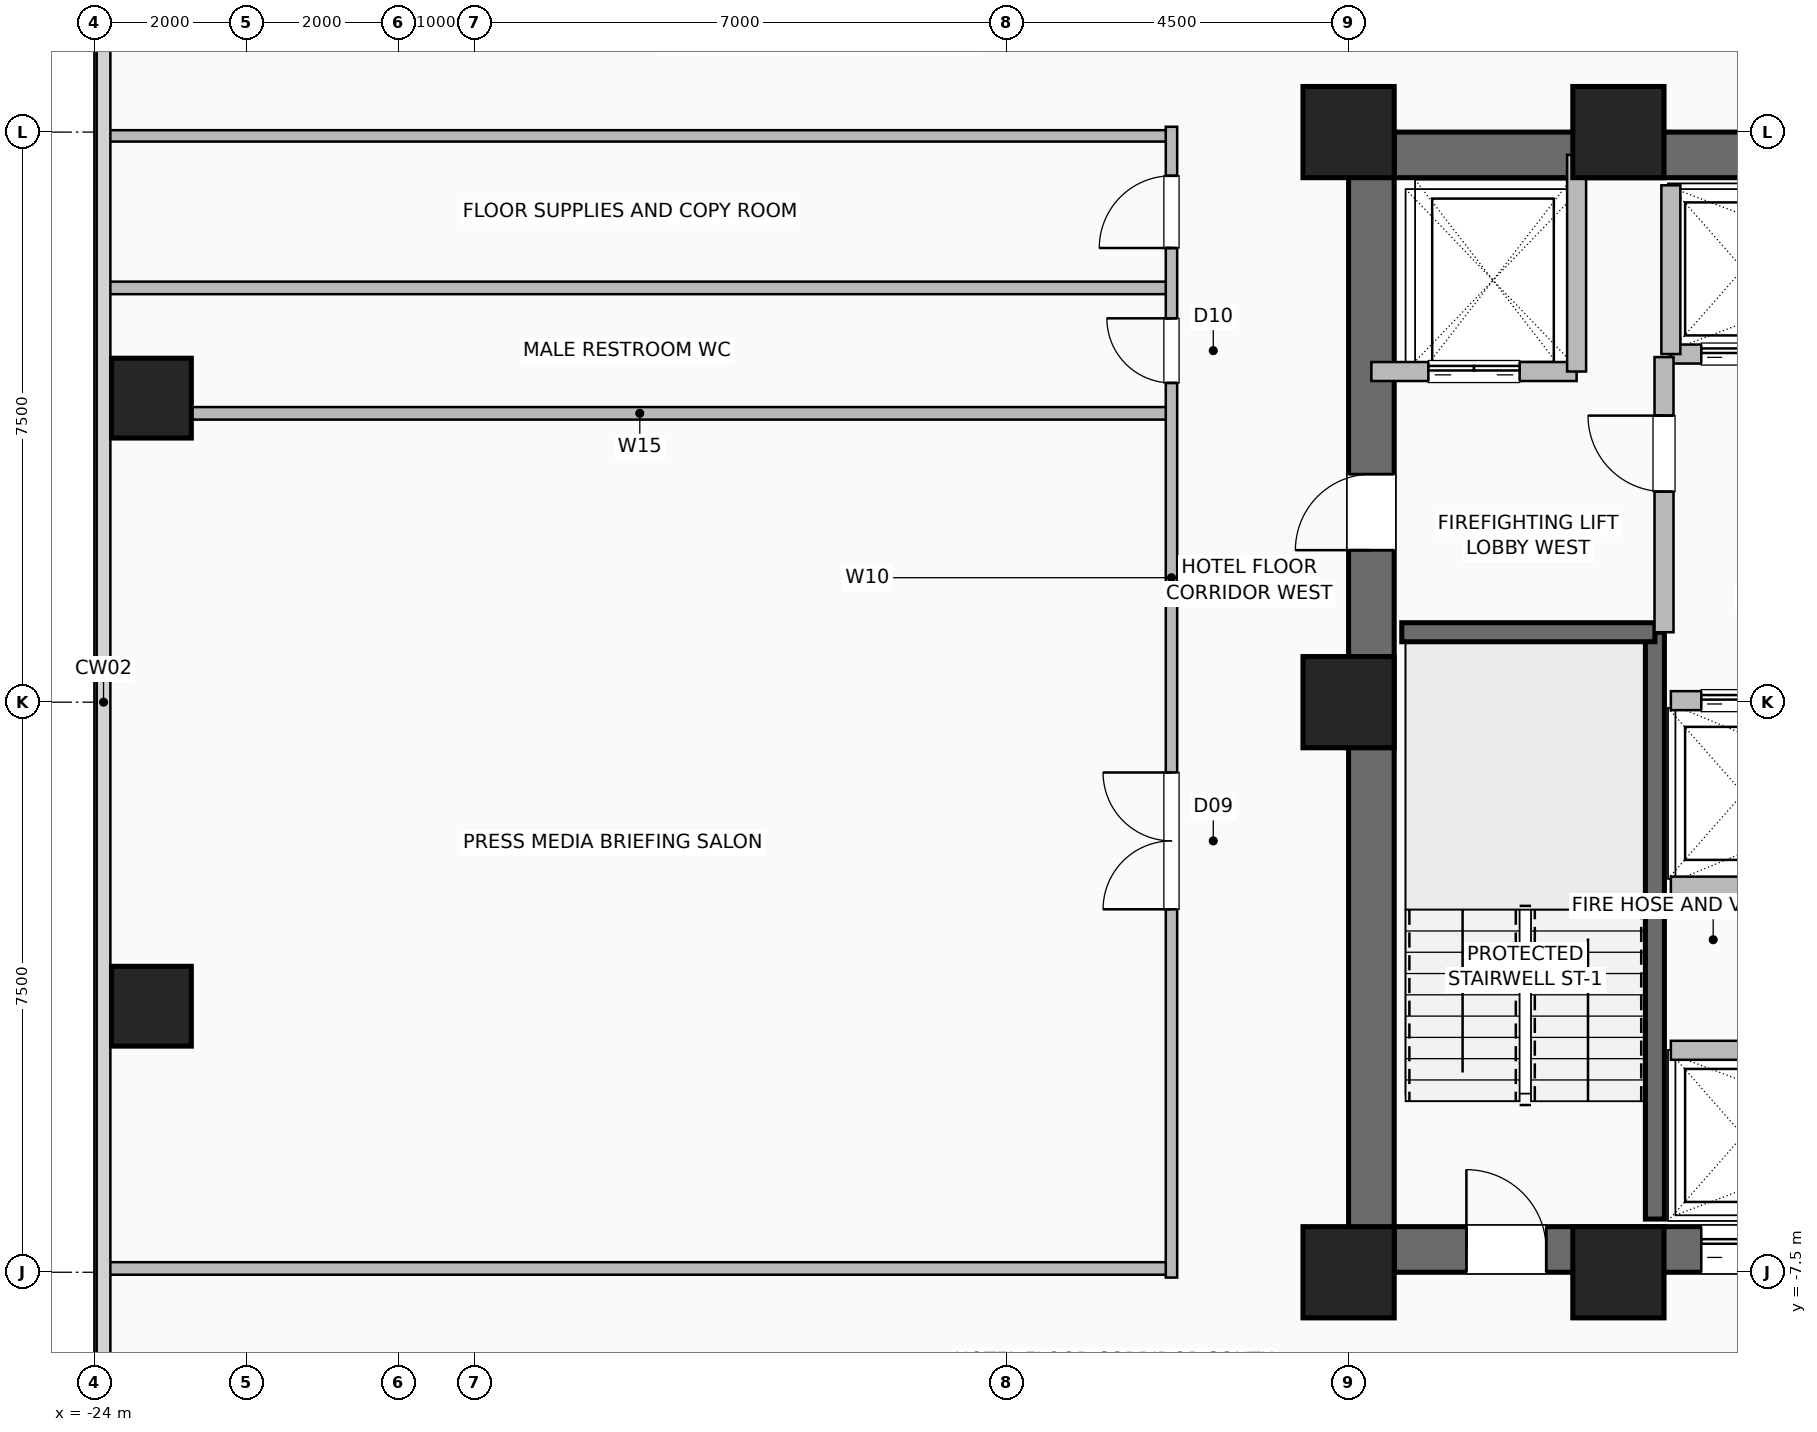
"""IFC4 building model, lengths in metres.
Left out: names, types, materials, properties, quantities, classifications, styles, units other than length and angle.
Written with IfcOpenShell. Run it as: python <this file> out.ifc"""

import sys

from ifc_helpers import new_model, si_unit, direction, frame, frame_2d, origin, origin_2d, place, context, subcontext, project, spatial, rectangle, hollow_rectangle, extrude, element, fill, save


model = new_model("IFC4")
c1 = context("Model", 3, precision=1e-05, world=origin(), true_north=direction((0.0, 1.0)))
c2 = subcontext(c1, "Body", "Model", "MODEL_VIEW")
j1 = project(units=[si_unit("LENGTHUNIT", "METRE"), si_unit("PLANEANGLEUNIT", "RADIAN")], contexts=[c1])
p1 = place(None, origin())
s1 = spatial("IfcSite", under=j1, at=p1, CompositionType="ELEMENT")
p2 = place(p1, origin())
s2 = spatial("IfcBuilding", under=s1, at=p2, CompositionType="ELEMENT")
p3 = place(p2, frame((0.0, 0.0, 41.0)))
s3 = spatial("IfcBuildingStorey", under=s2, at=p3, CompositionType="ELEMENT", Elevation=41.0)
for number, where, z_axis, x_axis in (
    (1, (-7.5, -7.5, 0.0), (0.0, 0.0, 1.0), (1.0, 0.0, 0.0)),
    (2, (-3.95, -7.5, 0.0), (0.0, 0.0, 1.0), (1.0, 0.0, 0.0)),
    (3, (-3.95, 7.5, 0.0), (0.0, 0.0, 1.0), (1.0, 0.0, 0.0)),
    (4, (-7.5, 7.5, 0.0), (0.0, 0.0, 1.0), (1.0, 0.0, 0.0)),
    (5, (-7.5, 0.0, 0.0), (0.0, 0.0, 1.0), (1.0, 0.0, 0.0)),
):
    element("IfcColumn", number, at=place(p3, frame(where, z_axis=z_axis, x_axis=x_axis)), inside=s3, PredefinedType="COLUMN", context=c2, shape_type="SweptSolid", body=[
        extrude(hollow_rectangle(XDim=1.2, YDim=1.2, WallThickness=0.055, at=origin_2d()), origin(), (0.0, 0.0, 1.0), 3.5),
    ])
for number, where, z_axis, x_axis in (
    (6, (-23.25, -4.0, 0.0), (0.0, 0.0, 1.0), (1.0, 0.0, 0.0)),
    (7, (-23.25, 4.0, 0.0), (0.0, 0.0, 1.0), (1.0, 0.0, 0.0)),
):
    element("IfcColumn", number, at=place(p3, frame(where, z_axis=z_axis, x_axis=x_axis)), inside=s3, PredefinedType="COLUMN", context=c2, shape_type="SweptSolid", body=[
        extrude(hollow_rectangle(XDim=1.05, YDim=1.05, WallThickness=0.05, at=origin_2d()), origin(), (0.0, 0.0, 1.0), 3.5),
    ])
p4 = place(p3, frame((-7.5, -7.2, 0.0), z_axis=(0.0, 0.0, 1.0), x_axis=(1.0, 0.0, 0.0)))
e8 = element("IfcWall", 8, at=p4, inside=s3, PredefinedType="SHEAR", context=c2, shape_type="SweptSolid", body=[
    extrude(rectangle(XDim=15.0, YDim=0.6, at=frame_2d((7.5, 0.0))), origin(), (0.0, 0.0, 1.0), 3.25),
])
p5 = place(p4, frame((1.55, 0.0, 0.0)))
e9 = element("IfcOpeningElement", 9, at=p5, cuts=e8, PredefinedType="OPENING", context=c2, shape_type="SweptSolid", body=[
    extrude(rectangle(XDim=1.05, YDim=2.08, at=frame_2d((0.525, 1.04))), frame((0.0, 0.31, 0.0), z_axis=(0.0, -1.0, 0.0), x_axis=(1.0, 0.0, 0.0)), (0.0, 0.0, 1.0), 0.62),
])
p6 = place(p4, frame((12.4, 0.0, 0.0)))
e10 = element("IfcOpeningElement", 10, at=p6, cuts=e8, PredefinedType="OPENING", context=c2, shape_type="SweptSolid", body=[
    extrude(rectangle(XDim=1.05, YDim=2.08, at=frame_2d((0.525, 1.04))), frame((0.0, 0.31, 0.0), z_axis=(0.0, -1.0, 0.0), x_axis=(1.0, 0.0, 0.0)), (0.0, 0.0, 1.0), 0.62),
])
p7 = place(p4, frame((4.64, 0.0, 0.0)))
e11 = element("IfcOpeningElement", 11, at=p7, cuts=e8, PredefinedType="OPENING", context=c2, shape_type="SweptSolid", body=[
    extrude(rectangle(XDim=1.1, YDim=2.2, at=frame_2d((0.55, 1.1))), frame((0.0, 0.31, 0.0), z_axis=(0.0, -1.0, 0.0), x_axis=(1.0, 0.0, 0.0)), (0.0, 0.0, 1.0), 0.62),
])
p8 = place(p4, frame((6.52, 0.0, 0.0)))
e12 = element("IfcOpeningElement", 12, at=p8, cuts=e8, PredefinedType="OPENING", context=c2, shape_type="SweptSolid", body=[
    extrude(rectangle(XDim=1.1, YDim=2.2, at=frame_2d((0.55, 1.1))), frame((0.0, 0.31, 0.0), z_axis=(0.0, -1.0, 0.0), x_axis=(1.0, 0.0, 0.0)), (0.0, 0.0, 1.0), 0.62),
])
p9 = place(p4, frame((8.4, 0.0, 0.0)))
e13 = element("IfcOpeningElement", 13, at=p9, cuts=e8, PredefinedType="OPENING", context=c2, shape_type="SweptSolid", body=[
    extrude(rectangle(XDim=1.1, YDim=2.2, at=frame_2d((0.55, 1.1))), frame((0.0, 0.31, 0.0), z_axis=(0.0, -1.0, 0.0), x_axis=(1.0, 0.0, 0.0)), (0.0, 0.0, 1.0), 0.62),
])
p10 = place(p3, frame((-7.5, 7.2, 0.0), z_axis=(0.0, 0.0, 1.0), x_axis=(1.0, 0.0, 0.0)))
e14 = element("IfcWall", 14, at=p10, inside=s3, PredefinedType="SHEAR", context=c2, shape_type="SweptSolid", body=[
    extrude(rectangle(XDim=15.0, YDim=0.6, at=frame_2d((7.5, 0.0))), origin(), (0.0, 0.0, 1.0), 3.25),
])
p11 = place(p3, frame((-7.2, -7.5, 0.0), z_axis=(0.0, 0.0, 1.0), x_axis=(0.0, 1.0, 0.0)))
e15 = element("IfcWall", 15, at=p11, inside=s3, PredefinedType="SHEAR", context=c2, shape_type="SweptSolid", body=[
    extrude(rectangle(XDim=15.0, YDim=0.6, at=frame_2d((7.5, 0.0))), origin(), (0.0, 0.0, 1.0), 3.25),
])
p12 = place(p11, frame((9.5, 0.0, 0.0)))
e16 = element("IfcOpeningElement", 16, at=p12, cuts=e15, PredefinedType="OPENING", context=c2, shape_type="SweptSolid", body=[
    extrude(rectangle(XDim=1.0, YDim=2.08, at=frame_2d((0.5, 1.04))), frame((0.0, 0.31, 0.0), z_axis=(0.0, -1.0, 0.0), x_axis=(1.0, 0.0, 0.0)), (0.0, 0.0, 1.0), 0.62),
])
p13 = place(p3, frame((-3.47, -6.8, 0.0), z_axis=(0.0, 0.0, 1.0), x_axis=(0.0, 1.0, 0.0)))
e17 = element("IfcWall", 17, at=p13, inside=s3, PredefinedType="SHEAR", context=c2, shape_type="SweptSolid", body=[
    extrude(rectangle(XDim=7.72, YDim=0.25, at=frame_2d((3.86, 0.0))), origin(), (0.0, 0.0, 1.0), 3.25),
])
p14 = place(p3, frame((-6.8, 0.92, 0.0), z_axis=(0.0, 0.0, 1.0), x_axis=(1.0, 0.0, 0.0)))
e18 = element("IfcWall", 18, at=p14, inside=s3, PredefinedType="SHEAR", context=c2, shape_type="SweptSolid", body=[
    extrude(rectangle(XDim=3.33, YDim=0.25, at=frame_2d((1.665, 0.0))), origin(), (0.0, 0.0, 1.0), 3.25),
])
p15 = place(p3, frame((-3.26, -4.58, 0.0), z_axis=(0.0, 0.0, 1.0), x_axis=(1.0, 0.0, 0.0)))
e19 = element("IfcWall", 19, at=p15, inside=s3, PredefinedType="SHEAR", context=c2, shape_type="SweptSolid", body=[
    extrude(rectangle(XDim=5.64, YDim=0.25, at=frame_2d((2.82, 0.0))), origin(), (0.0, 0.0, 1.0), 3.25),
])
p16 = place(p3, frame((-3.26, 0.02, 0.0), z_axis=(0.0, 0.0, 1.0), x_axis=(1.0, 0.0, 0.0)))
e20 = element("IfcWall", 20, at=p16, inside=s3, PredefinedType="SHEAR", context=c2, shape_type="SweptSolid", body=[
    extrude(rectangle(XDim=5.64, YDim=0.25, at=frame_2d((2.82, 0.0))), origin(), (0.0, 0.0, 1.0), 3.25),
])
p17 = place(p16, frame((0.4, 0.0, 0.0)))
e21 = element("IfcOpeningElement", 21, at=p17, cuts=e20, PredefinedType="OPENING", context=c2, shape_type="SweptSolid", body=[
    extrude(rectangle(XDim=1.1, YDim=2.2, at=frame_2d((0.55, 1.1))), frame((0.0, 0.135, 0.0), z_axis=(0.0, -1.0, 0.0), x_axis=(1.0, 0.0, 0.0)), (0.0, 0.0, 1.0), 0.27),
])
p18 = place(p16, frame((2.28, 0.0, 0.0)))
e22 = element("IfcOpeningElement", 22, at=p18, cuts=e20, PredefinedType="OPENING", context=c2, shape_type="SweptSolid", body=[
    extrude(rectangle(XDim=1.1, YDim=2.2, at=frame_2d((0.55, 1.1))), frame((0.0, 0.135, 0.0), z_axis=(0.0, -1.0, 0.0), x_axis=(1.0, 0.0, 0.0)), (0.0, 0.0, 1.0), 0.27),
])
p19 = place(p16, frame((4.16, 0.0, 0.0)))
e23 = element("IfcOpeningElement", 23, at=p19, cuts=e20, PredefinedType="OPENING", context=c2, shape_type="SweptSolid", body=[
    extrude(rectangle(XDim=1.1, YDim=2.2, at=frame_2d((0.55, 1.1))), frame((0.0, 0.135, 0.0), z_axis=(0.0, -1.0, 0.0), x_axis=(1.0, 0.0, 0.0)), (0.0, 0.0, 1.0), 0.27),
])
p20 = place(p3, frame((-3.26, -2.42, 0.0), z_axis=(0.0, 0.0, 1.0), x_axis=(1.0, 0.0, 0.0)))
e24 = element("IfcWall", 24, at=p20, inside=s3, PredefinedType="SHEAR", context=c2, shape_type="SweptSolid", body=[
    extrude(rectangle(XDim=5.64, YDim=0.25, at=frame_2d((2.82, 0.0))), origin(), (0.0, 0.0, 1.0), 3.25),
])
p21 = place(p3, frame((-3.26, 4.58, 0.0), z_axis=(0.0, 0.0, 1.0), x_axis=(1.0, 0.0, 0.0)))
e25 = element("IfcWall", 25, at=p21, inside=s3, PredefinedType="SHEAR", context=c2, shape_type="SweptSolid", body=[
    extrude(rectangle(XDim=5.64, YDim=0.25, at=frame_2d((2.82, 0.0))), origin(), (0.0, 0.0, 1.0), 3.25),
])
p22 = place(p21, frame((0.4, 0.0, 0.0)))
e26 = element("IfcOpeningElement", 26, at=p22, cuts=e25, PredefinedType="OPENING", context=c2, shape_type="SweptSolid", body=[
    extrude(rectangle(XDim=1.1, YDim=2.2, at=frame_2d((0.55, 1.1))), frame((0.0, 0.135, 0.0), z_axis=(0.0, -1.0, 0.0), x_axis=(1.0, 0.0, 0.0)), (0.0, 0.0, 1.0), 0.27),
])
p23 = place(p21, frame((2.28, 0.0, 0.0)))
e27 = element("IfcOpeningElement", 27, at=p23, cuts=e25, PredefinedType="OPENING", context=c2, shape_type="SweptSolid", body=[
    extrude(rectangle(XDim=1.1, YDim=2.2, at=frame_2d((0.55, 1.1))), frame((0.0, 0.135, 0.0), z_axis=(0.0, -1.0, 0.0), x_axis=(1.0, 0.0, 0.0)), (0.0, 0.0, 1.0), 0.27),
])
p24 = place(p21, frame((4.16, 0.0, 0.0)))
e28 = element("IfcOpeningElement", 28, at=p24, cuts=e25, PredefinedType="OPENING", context=c2, shape_type="SweptSolid", body=[
    extrude(rectangle(XDim=1.1, YDim=2.2, at=frame_2d((0.55, 1.1))), frame((0.0, 0.135, 0.0), z_axis=(0.0, -1.0, 0.0), x_axis=(1.0, 0.0, 0.0)), (0.0, 0.0, 1.0), 0.27),
])
p25 = place(p3, frame((-3.26, 4.58, 0.0), z_axis=(0.0, 0.0, 1.0), x_axis=(0.0, 1.0, 0.0)))
e29 = element("IfcWall", 29, at=p25, inside=s3, PredefinedType="SHEAR", context=c2, shape_type="SweptSolid", body=[
    extrude(rectangle(XDim=2.22, YDim=0.25, at=frame_2d((1.11, 0.0))), origin(), (0.0, 0.0, 1.0), 3.25),
])
p26 = place(p3, frame((-7.2, 4.35, 0.0), z_axis=(0.0, 0.0, 1.0), x_axis=(1.0, 0.0, 0.0)))
e30 = element("IfcWall", 30, at=p26, inside=s3, PredefinedType="SHEAR", context=c2, shape_type="SweptSolid", body=[
    extrude(rectangle(XDim=2.7, YDim=0.25, at=frame_2d((1.35, 0.0))), origin(), (0.0, 0.0, 1.0), 3.25),
])
p27 = place(p26, frame((0.75, 0.0, 0.0)))
e31 = element("IfcOpeningElement", 31, at=p27, cuts=e30, PredefinedType="OPENING", context=c2, shape_type="SweptSolid", body=[
    extrude(rectangle(XDim=1.2, YDim=2.2, at=frame_2d((0.6, 1.1))), frame((0.0, 0.135, 0.0), z_axis=(0.0, -1.0, 0.0), x_axis=(1.0, 0.0, 0.0)), (0.0, 0.0, 1.0), 0.27),
])
p28 = place(p3, frame((-4.5, 4.35, 0.0), z_axis=(0.0, 0.0, 1.0), x_axis=(0.0, 1.0, 0.0)))
e32 = element("IfcWall", 32, at=p28, inside=s3, PredefinedType="SHEAR", context=c2, shape_type="SweptSolid", body=[
    extrude(rectangle(XDim=2.85, YDim=0.25, at=frame_2d((1.425, 0.0))), origin(), (0.0, 0.0, 1.0), 3.25),
])
p29 = place(p3, frame((-3.35, 0.92, 0.0), z_axis=(0.0, 0.0, 1.0), x_axis=(0.0, 1.0, 0.0)))
e33 = element("IfcWall", 33, at=p29, inside=s3, PredefinedType="SHEAR", context=c2, shape_type="SweptSolid", body=[
    extrude(rectangle(XDim=3.62, YDim=0.25, at=frame_2d((1.81, 0.0))), origin(), (0.0, 0.0, 1.0), 3.25),
])
p30 = place(p29, frame((1.85, 0.0, 0.0)))
e34 = element("IfcOpeningElement", 34, at=p30, cuts=e33, PredefinedType="OPENING", context=c2, shape_type="SweptSolid", body=[
    extrude(rectangle(XDim=1.0, YDim=2.08, at=frame_2d((0.5, 1.04))), frame((0.0, 0.135, 0.0), z_axis=(0.0, -1.0, 0.0), x_axis=(1.0, 0.0, 0.0)), (0.0, 0.0, 1.0), 0.27),
])
for number, where, z_axis, x_axis in (
    (35, (-23.82, 5.45, 0.0), (0.0, 0.0, 1.0), (1.0, 0.0, 0.0)),
    (36, (-23.82, -7.45, 0.0), (0.0, 0.0, 1.0), (1.0, 0.0, 0.0)),
    (37, (-23.82, 3.8, 0.0), (0.0, 0.0, 1.0), (1.0, 0.0, 0.0)),
):
    element("IfcWall", number, at=place(p3, frame(where, z_axis=z_axis, x_axis=x_axis)), inside=s3, PredefinedType="PLUMBINGWALL", context=c2, shape_type="SweptSolid", body=[
        extrude(rectangle(XDim=13.99, YDim=0.165, at=frame_2d((6.995, 0.0))), origin(), (0.0, 0.0, 1.0), 3.25),
    ])
p31 = place(p3, frame((-23.82, 7.45, 0.0), z_axis=(0.0, 0.0, 1.0), x_axis=(1.0, 0.0, 0.0)))
e38 = element("IfcWall", 38, at=p31, inside=s3, PredefinedType="PARTITIONING", context=c2, shape_type="SweptSolid", body=[
    extrude(rectangle(XDim=13.99, YDim=0.15, at=frame_2d((6.995, 0.0))), origin(), (0.0, 0.0, 1.0), 3.25),
])
p32 = place(p3, frame((-9.83, -7.57, 0.0), z_axis=(0.0, 0.0, 1.0), x_axis=(0.0, 1.0, 0.0)))
e39 = element("IfcWall", 39, at=p32, inside=s3, PredefinedType="PARTITIONING", context=c2, shape_type="SweptSolid", body=[
    extrude(rectangle(XDim=15.14, YDim=0.15, at=frame_2d((7.57, 0.0))), origin(), (0.0, 0.0, 1.0), 3.25),
])
p33 = place(p32, frame((4.845, 0.0, 0.0)))
e40 = element("IfcOpeningElement", 40, at=p33, cuts=e39, PredefinedType="OPENING", context=c2, shape_type="SweptSolid", body=[
    extrude(rectangle(XDim=1.8, YDim=2.08, at=frame_2d((0.9, 1.04))), frame((0.0, 0.085, 0.0), z_axis=(0.0, -1.0, 0.0), x_axis=(1.0, 0.0, 0.0)), (0.0, 0.0, 1.0), 0.17),
])
p34 = place(p32, frame((11.77, 0.0, 0.0)))
e41 = element("IfcOpeningElement", 41, at=p34, cuts=e39, PredefinedType="OPENING", context=c2, shape_type="SweptSolid", body=[
    extrude(rectangle(XDim=0.85, YDim=2.05, at=frame_2d((0.425, 1.025))), frame((0.0, 0.085, 0.0), z_axis=(0.0, -1.0, 0.0), x_axis=(1.0, 0.0, 0.0)), (0.0, 0.0, 1.0), 0.17),
])
p35 = place(p32, frame((13.545, 0.0, 0.0)))
e42 = element("IfcOpeningElement", 42, at=p35, cuts=e39, PredefinedType="OPENING", context=c2, shape_type="SweptSolid", body=[
    extrude(rectangle(XDim=0.95, YDim=2.06, at=frame_2d((0.475, 1.03))), frame((0.0, 0.085, 0.0), z_axis=(0.0, -1.0, 0.0), x_axis=(1.0, 0.0, 0.0)), (0.0, 0.0, 1.0), 0.17),
])
p36 = place(p5, origin())
e43 = element("IfcDoor", 43, at=p36, inside=s3, OperationType="SINGLE_SWING_LEFT", PredefinedType="DOOR", context=c2, shape_type="SweptSolid", body=[
    extrude(rectangle(XDim=1.05, YDim=2.08, at=frame_2d((0.525, 1.04))), frame((0.0, 0.025, 0.0), z_axis=(0.0, -1.0, 0.0), x_axis=(1.0, 0.0, 0.0)), (0.0, 0.0, 1.0), 0.05),
])
fill(e9, e43)
p37 = place(p12, origin())
e44 = element("IfcDoor", 44, at=p37, inside=s3, OperationType="SINGLE_SWING_LEFT", PredefinedType="DOOR", context=c2, shape_type="SweptSolid", body=[
    extrude(rectangle(XDim=1.0, YDim=2.08, at=frame_2d((0.5, 1.04))), frame((0.0, 0.025, 0.0), z_axis=(0.0, -1.0, 0.0), x_axis=(1.0, 0.0, 0.0)), (0.0, 0.0, 1.0), 0.05),
])
fill(e16, e44)
p38 = place(p7, origin())
e45 = element("IfcDoor", 45, at=p38, inside=s3, OperationType="DOUBLE_DOOR_SLIDING", PredefinedType="DOOR", context=c2, shape_type="SweptSolid", body=[
    extrude(rectangle(XDim=1.1, YDim=2.2, at=frame_2d((0.55, 1.1))), frame((0.0, 0.025, 0.0), z_axis=(0.0, -1.0, 0.0), x_axis=(1.0, 0.0, 0.0)), (0.0, 0.0, 1.0), 0.05),
])
fill(e11, e45)
p39 = place(p17, origin())
e46 = element("IfcDoor", 46, at=p39, inside=s3, OperationType="DOUBLE_DOOR_SLIDING", PredefinedType="DOOR", context=c2, shape_type="SweptSolid", body=[
    extrude(rectangle(XDim=1.1, YDim=2.2, at=frame_2d((0.55, 1.1))), frame((0.0, 0.025, 0.0), z_axis=(0.0, -1.0, 0.0), x_axis=(1.0, 0.0, 0.0)), (0.0, 0.0, 1.0), 0.05),
])
fill(e21, e46)
p40 = place(p22, origin())
e47 = element("IfcDoor", 47, at=p40, inside=s3, OperationType="DOUBLE_DOOR_SLIDING", PredefinedType="DOOR", context=c2, shape_type="SweptSolid", body=[
    extrude(rectangle(XDim=1.1, YDim=2.2, at=frame_2d((0.55, 1.1))), frame((0.0, 0.025, 0.0), z_axis=(0.0, -1.0, 0.0), x_axis=(1.0, 0.0, 0.0)), (0.0, 0.0, 1.0), 0.05),
])
fill(e26, e47)
p41 = place(p27, origin())
e48 = element("IfcDoor", 48, at=p41, inside=s3, OperationType="DOUBLE_DOOR_SLIDING", PredefinedType="DOOR", context=c2, shape_type="SweptSolid", body=[
    extrude(rectangle(XDim=1.2, YDim=2.2, at=frame_2d((0.6, 1.1))), frame((0.0, 0.025, 0.0), z_axis=(0.0, -1.0, 0.0), x_axis=(1.0, 0.0, 0.0)), (0.0, 0.0, 1.0), 0.05),
])
fill(e31, e48)
p42 = place(p30, origin())
e49 = element("IfcDoor", 49, at=p42, inside=s3, OperationType="SINGLE_SWING_RIGHT", PredefinedType="DOOR", context=c2, shape_type="SweptSolid", body=[
    extrude(rectangle(XDim=1.0, YDim=2.08, at=frame_2d((0.5, 1.04))), frame((0.0, 0.025, 0.0), z_axis=(0.0, -1.0, 0.0), x_axis=(1.0, 0.0, 0.0)), (0.0, 0.0, 1.0), 0.05),
])
fill(e34, e49)
p43 = place(p33, origin())
e50 = element("IfcDoor", 50, at=p43, inside=s3, OperationType="DOUBLE_DOOR_SINGLE_SWING", PredefinedType="DOOR", context=c2, shape_type="SweptSolid", body=[
    extrude(rectangle(XDim=1.8, YDim=2.08, at=frame_2d((0.9, 1.04))), frame((0.0, 0.025, 0.0), z_axis=(0.0, -1.0, 0.0), x_axis=(1.0, 0.0, 0.0)), (0.0, 0.0, 1.0), 0.05),
])
fill(e40, e50)
p44 = place(p34, origin())
e51 = element("IfcDoor", 51, at=p44, inside=s3, OperationType="SINGLE_SWING_RIGHT", PredefinedType="DOOR", context=c2, shape_type="SweptSolid", body=[
    extrude(rectangle(XDim=0.85, YDim=2.05, at=frame_2d((0.425, 1.025))), frame((0.0, 0.025, 0.0), z_axis=(0.0, -1.0, 0.0), x_axis=(1.0, 0.0, 0.0)), (0.0, 0.0, 1.0), 0.05),
])
fill(e41, e51)
p45 = place(p35, origin())
e52 = element("IfcDoor", 52, at=p45, inside=s3, OperationType="SINGLE_SWING_LEFT", PredefinedType="DOOR", context=c2, shape_type="SweptSolid", body=[
    extrude(rectangle(XDim=0.95, YDim=2.06, at=frame_2d((0.475, 1.03))), frame((0.0, 0.025, 0.0), z_axis=(0.0, -1.0, 0.0), x_axis=(1.0, 0.0, 0.0)), (0.0, 0.0, 1.0), 0.05),
])
fill(e42, e52)
save(model, sys.argv[1])
